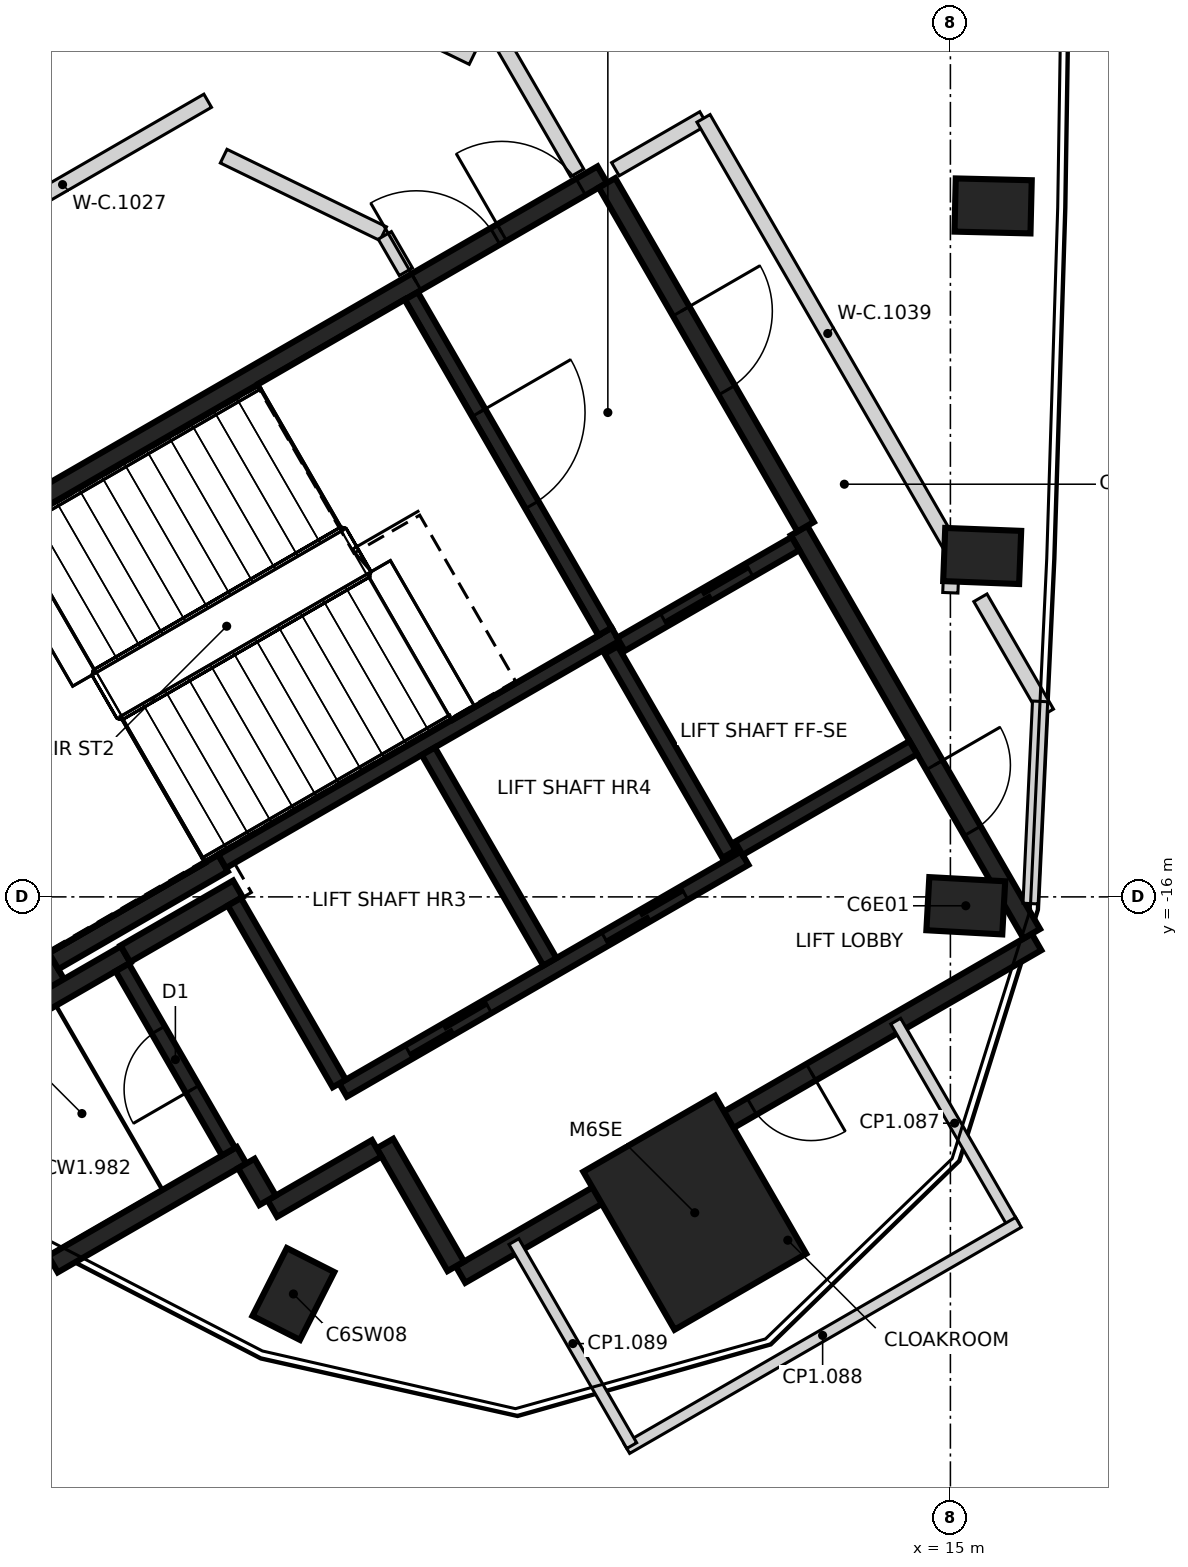
"""IFC4 building model, lengths in metres.
Left out: names, types, materials, properties, quantities, classifications, styles, units other than length and angle.
Written with IfcOpenShell. Run it as: python <this file> out.ifc"""

import sys

from ifc_helpers import new_model, si_unit, direction, frame, frame_2d, origin, origin_2d, place, context, subcontext, project, spatial, rectangle, extrude, element, fill, save


model = new_model("IFC4")
c1 = context("Model", 3, precision=1e-05, world=origin(), true_north=direction((0.0, 1.0)))
c2 = subcontext(c1, "Body", "Model", "MODEL_VIEW")
j1 = project(units=[si_unit("LENGTHUNIT", "METRE"), si_unit("PLANEANGLEUNIT", "RADIAN")], contexts=[c1])
p1 = place(None, origin())
s1 = spatial("IfcSite", under=j1, at=p1, CompositionType="ELEMENT")
p2 = place(p1, origin())
s2 = spatial("IfcBuilding", under=s1, at=p2, CompositionType="ELEMENT")
p3 = place(p2, frame((0.0, 0.0, 283.8)))
s3 = spatial("IfcBuildingStorey", under=s2, at=p3, CompositionType="ELEMENT", Elevation=283.8)
for number, where, z_axis, x_axis in (
    (1, (15.202, -16.117, -0.35), (0.0, 0.0, 1.0), (-0.998, 0.055, 0.0)),
    (2, (15.418, -11.515, -0.35), (0.0, 0.0, 1.0), (-0.999, 0.039, 0.0)),
    (3, (15.562, -6.91, -0.35), (0.0, 0.0, 1.0), (-1.0, 0.024, 0.0)),
    (4, (6.356, -21.224, -0.35), (0.0, 0.0, 1.0), (0.452, 0.892, 0.0)),
):
    element("IfcColumn", number, at=place(p3, frame(where, z_axis=z_axis, x_axis=x_axis)), inside=s3, PredefinedType="COLUMN", context=c2, shape_type="SweptSolid", body=[
        extrude(rectangle(XDim=1.0, YDim=0.7, at=origin_2d()), origin(), (0.0, 0.0, 1.0), 7.2),
    ])
p4 = place(p3, frame((11.637, -20.155, -0.35), z_axis=(0.0, 0.0, 1.0), x_axis=(-0.5, 0.866025403784, 0.0)))
e5 = element("IfcColumn", 5, at=p4, inside=s3, PredefinedType="COLUMN", context=c2, shape_type="SweptSolid", body=[
    extrude(rectangle(XDim=2.4, YDim=2.0, at=origin_2d()), origin(), (0.0, 0.0, 1.0), 7.2),
])
p5 = place(p3, frame((0.417, -12.273, 0.0), z_axis=(0.0, 0.0, 1.0), x_axis=(0.866021906294, 0.500006057782, 0.0)))
e6 = element("IfcWall", 6, at=p5, inside=s3, PredefinedType="SHEAR", context=c2, shape_type="SweptSolid", body=[
    extrude(rectangle(XDim=11.55, YDim=0.25, at=frame_2d((5.775, 0.0))), origin(), (0.0, 0.0, 1.0), 6.85),
])
p6 = place(p5, frame((10.025, 0.0, 0.0)))
e7 = element("IfcOpeningElement", 7, at=p6, cuts=e6, PredefinedType="OPENING", context=c2, shape_type="SweptSolid", body=[
    extrude(rectangle(XDim=1.2, YDim=2.1, at=frame_2d((0.6, 1.05))), frame((0.0, 0.135, 0.0), z_axis=(0.0, -1.0, 0.0), x_axis=(1.0, 0.0, 0.0)), (0.0, 0.0, 1.0), 0.27),
])
p7 = place(p5, frame((8.725, 0.0, 0.0)))
e8 = element("IfcOpeningElement", 8, at=p7, cuts=e6, PredefinedType="OPENING", context=c2, shape_type="SweptSolid", body=[
    extrude(rectangle(XDim=1.2, YDim=2.1, at=frame_2d((0.6, 1.05))), frame((0.0, 0.135, 0.0), z_axis=(0.0, -1.0, 0.0), x_axis=(1.0, 0.0, 0.0)), (0.0, 0.0, 1.0), 0.27),
])
p8 = place(p3, frame((16.133, -16.594, 0.0), z_axis=(0.0, 0.0, 1.0), x_axis=(-0.866022959057, -0.500004234368, 0.0)))
e9 = element("IfcWall", 9, at=p8, inside=s3, PredefinedType="SHEAR", context=c2, shape_type="SweptSolid", body=[
    extrude(rectangle(XDim=8.75, YDim=0.25, at=frame_2d((4.375, 0.0))), origin(), (0.0, 0.0, 1.0), 6.85),
])
p9 = place(p8, frame((3.425, 0.0, 0.0)))
e10 = element("IfcOpeningElement", 10, at=p9, cuts=e9, PredefinedType="OPENING", context=c2, shape_type="SweptSolid", body=[
    extrude(rectangle(XDim=0.9, YDim=2.1, at=frame_2d((0.45, 1.05))), frame((0.0, 0.135, 0.0), z_axis=(0.0, -1.0, 0.0), x_axis=(1.0, 0.0, 0.0)), (0.0, 0.0, 1.0), 0.27),
])
p10 = place(p3, frame((13.008, -11.181, 0.0), z_axis=(0.0, 0.0, 1.0), x_axis=(0.500001955336, -0.866024274868, 0.0)))
e11 = element("IfcWall", 11, at=p10, inside=s3, PredefinedType="SHEAR", context=c2, shape_type="SweptSolid", body=[
    extrude(rectangle(XDim=6.125, YDim=0.25, at=frame_2d((3.062, 0.0))), origin(), (0.0, 0.0, 1.0), 6.85),
])
p11 = place(p10, frame((3.563, 0.0, 0.0)))
e12 = element("IfcOpeningElement", 12, at=p11, cuts=e11, PredefinedType="OPENING", context=c2, shape_type="SweptSolid", body=[
    extrude(rectangle(XDim=1.0, YDim=2.1, at=frame_2d((0.5, 1.05))), frame((0.0, 0.135, 0.0), z_axis=(0.0, -1.0, 0.0), x_axis=(1.0, 0.0, 0.0)), (0.0, 0.0, 1.0), 0.27),
])
p12 = place(p3, frame((3.235, -17.153, 0.0), z_axis=(0.0, 0.0, 1.0), x_axis=(-0.500008851346, 0.866020293397, 0.0)))
e13 = element("IfcWall", 13, at=p12, inside=s3, PredefinedType="SHEAR", context=c2, shape_type="SweptSolid", body=[
    extrude(rectangle(XDim=5.51, YDim=0.25, at=frame_2d((2.755, 0.0))), origin(), (0.0, 0.0, 1.0), 6.85),
])
p13 = place(p3, frame((10.483, -6.606, 0.0), z_axis=(0.0, 0.0, 1.0), x_axis=(0.49999885962, -0.866026062182, 0.0)))
e14 = element("IfcWall", 14, at=p13, inside=s3, PredefinedType="SHEAR", context=c2, shape_type="SweptSolid", body=[
    extrude(rectangle(XDim=5.225, YDim=0.25, at=frame_2d((2.612, 0.0))), origin(), (0.0, 0.0, 1.0), 6.85),
])
p14 = place(p13, frame((1.95, 0.0, 0.0)))
e15 = element("IfcOpeningElement", 15, at=p14, cuts=e14, PredefinedType="OPENING", context=c2, shape_type="SweptSolid", body=[
    extrude(rectangle(XDim=1.2, YDim=2.1, at=frame_2d((0.6, 1.05))), frame((0.0, 0.135, 0.0), z_axis=(0.0, -1.0, 0.0), x_axis=(1.0, 0.0, 0.0)), (0.0, 0.0, 1.0), 0.27),
])
p15 = place(p3, frame((3.085, -20.894, 0.0), z_axis=(0.0, 0.0, 1.0), x_axis=(-0.499978833458, 0.866037623948, 0.0)))
e16 = element("IfcWall", 16, at=p15, inside=s3, PredefinedType="SHEAR", context=c2, shape_type="SweptSolid", body=[
    extrude(rectangle(XDim=3.05, YDim=0.25, at=frame_2d((1.525, 0.0))), origin(), (0.0, 0.0, 1.0), 6.85),
])
p16 = place(p3, frame((1.669, -18.19, 0.0), z_axis=(0.0, 0.0, 1.0), x_axis=(0.866042235819, 0.499970844928, 0.0)))
e17 = element("IfcWall", 17, at=p16, inside=s3, PredefinedType="SHEAR", context=c2, shape_type="SweptSolid", body=[
    extrude(rectangle(XDim=2.865, YDim=0.25, at=frame_2d((1.432, 0.0))), origin(), (0.0, 0.0, 1.0), 6.85),
])
p17 = place(p3, frame((5.675, -19.399, 0.0), z_axis=(0.0, 0.0, 1.0), x_axis=(-0.866026637627, -0.499997862916, 0.0)))
e18 = element("IfcWall", 18, at=p17, inside=s3, PredefinedType="SHEAR", context=c2, shape_type="SweptSolid", body=[
    extrude(rectangle(XDim=2.865, YDim=0.25, at=frame_2d((1.432, 0.0))), origin(), (0.0, 0.0, 1.0), 6.85),
])
p18 = place(p3, frame((5.431, -15.556, 0.0), z_axis=(0.0, 0.0, 1.0), x_axis=(-0.866022940537, -0.500004266446, 0.0)))
e19 = element("IfcWall", 19, at=p18, inside=s3, PredefinedType="SHEAR", context=c2, shape_type="SweptSolid", body=[
    extrude(rectangle(XDim=2.575, YDim=0.25, at=frame_2d((1.287, 0.0))), origin(), (0.0, 0.0, 1.0), 6.85),
])
p19 = place(p3, frame((8.493, -20.86, 0.0), z_axis=(0.0, 0.0, 1.0), x_axis=(-0.500039802285, 0.866002422705, 0.0)))
e20 = element("IfcWall", 20, at=p19, inside=s3, PredefinedType="SHEAR", context=c2, shape_type="SweptSolid", body=[
    extrude(rectangle(XDim=1.865, YDim=0.25, at=frame_2d((0.932, 0.0))), origin(), (0.0, 0.0, 1.0), 6.85),
])
p20 = place(p3, frame((4.145, -16.749, 0.0), z_axis=(0.0, 0.0, 1.0), x_axis=(0.866038183914, 0.499977863513, 0.0)))
e21 = element("IfcWall", 21, at=p20, inside=s3, PredefinedType="SHEAR", context=c2, shape_type="SweptSolid", body=[
    extrude(rectangle(XDim=1.71, YDim=0.25, at=frame_2d((0.855, 0.0))), origin(), (0.0, 0.0, 1.0), 6.85),
])
p21 = place(p3, frame((7.452, -19.308, 0.0), z_axis=(0.0, 0.0, 1.0), x_axis=(-0.866044474677, -0.49996696679, 0.0)))
e22 = element("IfcWall", 22, at=p21, inside=s3, PredefinedType="SHEAR", context=c2, shape_type="SweptSolid", body=[
    extrude(rectangle(XDim=1.584, YDim=0.25, at=frame_2d((0.792, 0.0))), origin(), (0.0, 0.0, 1.0), 6.85),
])
p22 = place(p3, frame((6.017, -19.992, 0.0), z_axis=(0.0, 0.0, 1.0), x_axis=(-0.500364886717, 0.865814633822, 0.0)))
e23 = element("IfcWall", 23, at=p22, inside=s3, PredefinedType="SHEAR", context=c2, shape_type="SweptSolid", body=[
    extrude(rectangle(XDim=0.559, YDim=0.25, at=frame_2d((0.28, 0.0))), origin(), (0.0, 0.0, 1.0), 6.85),
])
p23 = place(p3, frame((5.419, -15.534, 0.0), z_axis=(0.0, 0.0, 1.0), x_axis=(0.866029065029, 0.499993658486, 0.0)))
e24 = element("IfcWall", 24, at=p23, inside=s3, PredefinedType="SHEAR", context=c2, shape_type="SweptSolid", body=[
    extrude(rectangle(XDim=5.974, YDim=0.2, at=frame_2d((2.987, 0.0))), origin(), (0.0, 0.0, 1.0), 6.85),
])
p24 = place(p3, frame((7.01, -18.542, 0.0), z_axis=(0.0, 0.0, 1.0), x_axis=(0.866030299012, 0.499991521122, 0.0)))
e25 = element("IfcWall", 25, at=p24, inside=s3, PredefinedType="SHEAR", context=c2, shape_type="SweptSolid", body=[
    extrude(rectangle(XDim=6.1, YDim=0.2, at=frame_2d((3.05, 0.0))), origin(), (0.0, 0.0, 1.0), 6.85),
])
p25 = place(p24, frame((1.0, 0.0, 0.0)))
e26 = element("IfcOpeningElement", 26, at=p25, cuts=e25, PredefinedType="OPENING", context=c2, shape_type="SweptSolid", body=[
    extrude(rectangle(XDim=1.2, YDim=2.1, at=frame_2d((0.6, 1.05))), frame((0.0, 0.11, 0.0), z_axis=(0.0, -1.0, 0.0), x_axis=(1.0, 0.0, 0.0)), (0.0, 0.0, 1.0), 0.22),
])
p26 = place(p24, frame((3.982, 0.0, 0.0)))
e27 = element("IfcOpeningElement", 27, at=p26, cuts=e25, PredefinedType="OPENING", context=c2, shape_type="SweptSolid", body=[
    extrude(rectangle(XDim=1.2, YDim=2.1, at=frame_2d((0.6, 1.05))), frame((0.0, 0.11, 0.0), z_axis=(0.0, -1.0, 0.0), x_axis=(1.0, 0.0, 0.0)), (0.0, 0.0, 1.0), 0.22),
])
p27 = place(p3, frame((7.906, -8.094, 0.0), z_axis=(0.0, 0.0, 1.0), x_axis=(0.500027839223, -0.866009330205, 0.0)))
e28 = element("IfcWall", 28, at=p27, inside=s3, PredefinedType="SHEAR", context=c2, shape_type="SweptSolid", body=[
    extrude(rectangle(XDim=5.098, YDim=0.2, at=frame_2d((2.549, 0.0))), origin(), (0.0, 0.0, 1.0), 6.85),
])
p28 = place(p27, frame((1.774, 0.0, 0.0)))
e29 = element("IfcOpeningElement", 29, at=p28, cuts=e28, PredefinedType="OPENING", context=c2, shape_type="SweptSolid", body=[
    extrude(rectangle(XDim=1.4, YDim=2.1, at=frame_2d((0.7, 1.05))), frame((0.0, 0.11, 0.0), z_axis=(0.0, -1.0, 0.0), x_axis=(1.0, 0.0, 0.0)), (0.0, 0.0, 1.0), 0.22),
])
p29 = place(p3, frame((8.132, -14.084, 0.0), z_axis=(0.0, 0.0, 1.0), x_axis=(0.499997778408, -0.866026686418, 0.0)))
e30 = element("IfcWall", 30, at=p29, inside=s3, PredefinedType="SHEAR", context=c2, shape_type="SweptSolid", body=[
    extrude(rectangle(XDim=3.198, YDim=0.2, at=frame_2d((1.599, 0.0))), origin(), (0.0, 0.0, 1.0), 6.85),
])
p30 = place(p3, frame((5.503, -19.352, 0.0), z_axis=(0.0, 0.0, 1.0), x_axis=(-0.499986818241, 0.866033014143, 0.0)))
e31 = element("IfcWall", 31, at=p30, inside=s3, PredefinedType="SHEAR", context=c2, shape_type="SweptSolid", body=[
    extrude(rectangle(XDim=2.798, YDim=0.2, at=frame_2d((1.399, 0.0))), origin(), (0.0, 0.0, 1.0), 6.85),
])
p31 = place(p30, frame((0.949, 0.0, 0.0)))
e32 = element("IfcOpeningElement", 32, at=p31, cuts=e31, PredefinedType="OPENING", context=c2, shape_type="SweptSolid", body=[
    extrude(rectangle(XDim=0.9, YDim=2.1, at=frame_2d((0.45, 1.05))), frame((0.0, 0.11, 0.0), z_axis=(0.0, -1.0, 0.0), x_axis=(1.0, 0.0, 0.0)), (0.0, 0.0, 1.0), 0.22),
])
p32 = place(p3, frame((6.96, -18.455, 0.0), z_axis=(0.0, 0.0, 1.0), x_axis=(-0.499926705758, 0.866067716099, 0.0)))
e33 = element("IfcWall", 33, at=p32, inside=s3, PredefinedType="SHEAR", context=c2, shape_type="SweptSolid", body=[
    extrude(rectangle(XDim=2.759, YDim=0.2, at=frame_2d((1.38, 0.0))), origin(), (0.0, 0.0, 1.0), 6.85),
])
p33 = place(p3, frame((12.088, -15.437, 0.0), z_axis=(0.0, 0.0, 1.0), x_axis=(-0.500026960575, 0.86600983753, 0.0)))
e34 = element("IfcWall", 34, at=p33, inside=s3, PredefinedType="SHEAR", context=c2, shape_type="SweptSolid", body=[
    extrude(rectangle(XDim=3.1, YDim=0.2, at=frame_2d((1.55, 0.0))), origin(), (0.0, 0.0, 1.0), 6.85),
])
p34 = place(p3, frame((10.666, -12.678, 0.0), z_axis=(0.0, 0.0, 1.0), x_axis=(0.866018407898, 0.500012117035, 0.0)))
e35 = element("IfcWall", 35, at=p34, inside=s3, PredefinedType="SHEAR", context=c2, shape_type="SweptSolid", body=[
    extrude(rectangle(XDim=2.651, YDim=0.2, at=frame_2d((1.325, 0.0))), origin(), (0.0, 0.0, 1.0), 6.85),
])
p35 = place(p34, frame((0.652, 0.0, 0.0)))
e36 = element("IfcOpeningElement", 36, at=p35, cuts=e35, PredefinedType="OPENING", context=c2, shape_type="SweptSolid", body=[
    extrude(rectangle(XDim=1.3, YDim=2.1, at=frame_2d((0.65, 1.05))), frame((0.0, 0.11, 0.0), z_axis=(0.0, -1.0, 0.0), x_axis=(1.0, 0.0, 0.0)), (0.0, 0.0, 1.0), 0.22),
])
p36 = place(p3, frame((14.512, -14.037, 0.0), z_axis=(0.0, 0.0, 1.0), x_axis=(-0.866018407898, -0.500012117035, 0.0)))
e37 = element("IfcWall", 37, at=p36, inside=s3, PredefinedType="SHEAR", context=c2, shape_type="SweptSolid", body=[
    extrude(rectangle(XDim=2.651, YDim=0.2, at=frame_2d((1.325, 0.0))), origin(), (0.0, 0.0, 1.0), 6.85),
])
p37 = place(p3, frame((14.281, -17.635, 0.0), z_axis=(0.0, 0.0, 1.0), x_axis=(0.49999285859, -0.86602952684, 0.0)))
e38 = element("IfcWall", 38, at=p37, inside=s3, PredefinedType="PARTITIONING", context=c2, shape_type="SweptSolid", body=[
    extrude(rectangle(XDim=3.1, YDim=0.15, at=frame_2d((1.55, 0.0))), origin(), (0.0, 0.0, 1.0), 6.85),
])
p38 = place(p3, frame((15.896, -20.282, 0.0), z_axis=(0.0, 0.0, 1.0), x_axis=(-0.866017493347, -0.500013701029, 0.0)))
e39 = element("IfcWall", 39, at=p38, inside=s3, PredefinedType="PARTITIONING", context=c2, shape_type="SweptSolid", body=[
    extrude(rectangle(XDim=5.95, YDim=0.15, at=frame_2d((2.975, 0.0))), origin(), (0.0, 0.0, 1.0), 6.85),
])
p39 = place(p3, frame((10.808, -23.219, 0.0), z_axis=(0.0, 0.0, 1.0), x_axis=(-0.500026960575, 0.86600983753, 0.0)))
e40 = element("IfcWall", 40, at=p39, inside=s3, PredefinedType="PARTITIONING", context=c2, shape_type="SweptSolid", body=[
    extrude(rectangle(XDim=3.1, YDim=0.15, at=frame_2d((1.55, 0.0))), origin(), (0.0, 0.0, 1.0), 6.85),
])
p40 = place(p3, frame((1.41, -7.733, 0.0), z_axis=(0.0, 0.0, 1.0), x_axis=(0.865821381066, 0.50035321133, 0.0)))
e41 = element("IfcWall", 41, at=p40, inside=s3, PredefinedType="PARTITIONING", context=c2, shape_type="SweptSolid", body=[
    extrude(rectangle(XDim=4.411, YDim=0.2, at=frame_2d((2.206, 0.0))), origin(), (0.0, 0.0, 1.0), 6.85),
])
p41 = place(p3, frame((5.439, -6.255, 0.0), z_axis=(0.0, 0.0, 1.0), x_axis=(0.899432970097, -0.437058728665, 0.0)))
e42 = element("IfcWall", 42, at=p41, inside=s3, PredefinedType="PARTITIONING", context=c2, shape_type="SweptSolid", body=[
    extrude(rectangle(XDim=2.334, YDim=0.2, at=frame_2d((1.167, 0.0))), origin(), (0.0, 0.0, 1.0), 6.85),
])
p42 = place(p3, frame((6.587, -3.922, 0.0), z_axis=(0.0, 0.0, 1.0), x_axis=(0.899126380137, -0.437689104892, 0.0)))
e43 = element("IfcWall", 43, at=p42, inside=s3, PredefinedType="PARTITIONING", context=c2, shape_type="SweptSolid", body=[
    extrude(rectangle(XDim=2.365, YDim=0.2, at=frame_2d((1.182, 0.0))), origin(), (0.0, 0.0, 1.0), 6.85),
])
p43 = place(p3, frame((7.559, -7.297, 0.0), z_axis=(0.0, 0.0, 1.0), x_axis=(0.500740595022, -0.86559739862, 0.0)))
e44 = element("IfcWall", 44, at=p43, inside=s3, PredefinedType="PARTITIONING", context=c2, shape_type="SweptSolid", body=[
    extrude(rectangle(XDim=0.553, YDim=0.2, at=frame_2d((0.277, 0.0))), origin(), (0.0, 0.0, 1.0), 6.85),
])
p44 = place(p3, frame((9.1, -4.765, 0.0), z_axis=(0.0, 0.0, 1.0), x_axis=(0.500948590405, -0.865477041736, 0.0)))
e45 = element("IfcWall", 45, at=p44, inside=s3, PredefinedType="PARTITIONING", context=c2, shape_type="SweptSolid", body=[
    extrude(rectangle(XDim=1.976, YDim=0.2, at=frame_2d((0.988, 0.0))), origin(), (0.0, 0.0, 1.0), 6.85),
])
p45 = place(p3, frame((10.593, -6.427, 0.0), z_axis=(0.0, 0.0, 1.0), x_axis=(0.866115802186, 0.499843392678, 0.0)))
e46 = element("IfcWall", 46, at=p45, inside=s3, PredefinedType="PARTITIONING", context=c2, shape_type="SweptSolid", body=[
    extrude(rectangle(XDim=1.34, YDim=0.2, at=frame_2d((0.67, 0.0))), origin(), (0.0, 0.0, 1.0), 6.85),
])
p46 = place(p3, frame((11.752, -5.758, 0.0), z_axis=(0.0, 0.0, 1.0), x_axis=(0.500199816633, -0.865910008858, 0.0)))
e47 = element("IfcWall", 47, at=p46, inside=s3, PredefinedType="PARTITIONING", context=c2, shape_type="SweptSolid", body=[
    extrude(rectangle(XDim=6.537, YDim=0.2, at=frame_2d((3.269, 0.0))), origin(), (0.0, 0.0, 1.0), 6.85),
])
p47 = place(p3, frame((14.999, -11.999, 0.0), z_axis=(0.0, 0.0, 1.0), x_axis=(0.039465029208, 0.999220952277, 0.0)))
e48 = element("IfcWall", 48, at=p47, inside=s3, PredefinedType="PARTITIONING", context=c2, shape_type="SweptSolid", body=[
    extrude(rectangle(XDim=0.582, YDim=0.2, at=frame_2d((0.291, 0.0))), origin(), (0.0, 0.0, 1.0), 6.85),
])
p48 = place(p3, frame((15.395, -12.065, 0.0), z_axis=(0.0, 0.0, 1.0), x_axis=(0.500177586754, -0.865922849744, 0.0)))
e49 = element("IfcWall", 49, at=p48, inside=s3, PredefinedType="PARTITIONING", context=c2, shape_type="SweptSolid", body=[
    extrude(rectangle(XDim=1.749, YDim=0.2, at=frame_2d((0.875, 0.0))), origin(), (0.0, 0.0, 1.0), 5.95),
])
p49 = place(p3, frame((16.055, -16.088, 0.0), z_axis=(0.0, 0.0, 1.0), x_axis=(0.046937929303, 0.998897807983, 0.0)))
e50 = element("IfcWall", 50, at=p49, inside=s3, PredefinedType="PARTITIONING", context=c2, shape_type="SweptSolid", body=[
    extrude(rectangle(XDim=2.663, YDim=0.2, at=frame_2d((1.332, 0.0))), origin(), (0.0, 0.0, 1.0), 6.85),
])
p50 = place(p35, origin())
e51 = element("IfcDoor", 51, at=p50, inside=s3, OperationType="SLIDING_TO_LEFT", PredefinedType="DOOR", context=c2, shape_type="SweptSolid", body=[
    extrude(rectangle(XDim=1.3, YDim=2.1, at=frame_2d((0.65, 1.05))), frame((0.0, 0.025, 0.0), z_axis=(0.0, -1.0, 0.0), x_axis=(1.0, 0.0, 0.0)), (0.0, 0.0, 1.0), 0.05),
])
fill(e36, e51)
p51 = place(p25, origin())
e52 = element("IfcDoor", 52, at=p51, inside=s3, OperationType="DOUBLE_DOOR_SLIDING", PredefinedType="DOOR", context=c2, shape_type="SweptSolid", body=[
    extrude(rectangle(XDim=1.2, YDim=2.1, at=frame_2d((0.6, 1.05))), frame((0.0, 0.025, 0.0), z_axis=(0.0, -1.0, 0.0), x_axis=(1.0, 0.0, 0.0)), (0.0, 0.0, 1.0), 0.05),
])
fill(e26, e52)
p52 = place(p26, origin())
e53 = element("IfcDoor", 53, at=p52, inside=s3, OperationType="DOUBLE_DOOR_SLIDING", PredefinedType="DOOR", context=c2, shape_type="SweptSolid", body=[
    extrude(rectangle(XDim=1.2, YDim=2.1, at=frame_2d((0.6, 1.05))), frame((0.0, 0.025, 0.0), z_axis=(0.0, -1.0, 0.0), x_axis=(1.0, 0.0, 0.0)), (0.0, 0.0, 1.0), 0.05),
])
fill(e27, e53)
p53 = place(p11, origin())
e54 = element("IfcDoor", 54, at=p53, inside=s3, OperationType="SINGLE_SWING_LEFT", PredefinedType="DOOR", context=c2, shape_type="SweptSolid", body=[
    extrude(rectangle(XDim=1.0, YDim=2.1, at=frame_2d((0.5, 1.05))), frame((0.0, 0.025, 0.0), z_axis=(0.0, -1.0, 0.0), x_axis=(1.0, 0.0, 0.0)), (0.0, 0.0, 1.0), 0.05),
])
fill(e12, e54)
p54 = place(p6, origin())
e55 = element("IfcDoor", 55, at=p54, inside=s3, OperationType="SINGLE_SWING_LEFT", PredefinedType="DOOR", context=c2, shape_type="SweptSolid", body=[
    extrude(rectangle(XDim=1.2, YDim=2.1, at=frame_2d((0.6, 1.05))), frame((0.0, 0.025, 0.0), z_axis=(0.0, -1.0, 0.0), x_axis=(1.0, 0.0, 0.0)), (0.0, 0.0, 1.0), 0.05),
])
fill(e7, e55)
p55 = place(p7, origin())
e56 = element("IfcDoor", 56, at=p55, inside=s3, OperationType="SINGLE_SWING_RIGHT", PredefinedType="DOOR", context=c2, shape_type="SweptSolid", body=[
    extrude(rectangle(XDim=1.2, YDim=2.1, at=frame_2d((0.6, 1.05))), frame((0.0, 0.025, 0.0), z_axis=(0.0, -1.0, 0.0), x_axis=(1.0, 0.0, 0.0)), (0.0, 0.0, 1.0), 0.05),
])
fill(e8, e56)
p56 = place(p14, origin())
e57 = element("IfcDoor", 57, at=p56, inside=s3, OperationType="SINGLE_SWING_LEFT", PredefinedType="DOOR", context=c2, shape_type="SweptSolid", body=[
    extrude(rectangle(XDim=1.2, YDim=2.1, at=frame_2d((0.6, 1.05))), frame((0.0, 0.025, 0.0), z_axis=(0.0, -1.0, 0.0), x_axis=(1.0, 0.0, 0.0)), (0.0, 0.0, 1.0), 0.05),
])
fill(e15, e57)
p57 = place(p28, origin())
e58 = element("IfcDoor", 58, at=p57, inside=s3, OperationType="SINGLE_SWING_RIGHT", PredefinedType="DOOR", context=c2, shape_type="SweptSolid", body=[
    extrude(rectangle(XDim=1.4, YDim=2.1, at=frame_2d((0.7, 1.05))), frame((0.0, 0.025, 0.0), z_axis=(0.0, -1.0, 0.0), x_axis=(1.0, 0.0, 0.0)), (0.0, 0.0, 1.0), 0.05),
])
fill(e29, e58)
p58 = place(p31, origin())
e59 = element("IfcDoor", 59, at=p58, inside=s3, OperationType="SINGLE_SWING_LEFT", PredefinedType="DOOR", context=c2, shape_type="SweptSolid", body=[
    extrude(rectangle(XDim=0.9, YDim=2.1, at=frame_2d((0.45, 1.05))), frame((0.0, 0.025, 0.0), z_axis=(0.0, -1.0, 0.0), x_axis=(1.0, 0.0, 0.0)), (0.0, 0.0, 1.0), 0.05),
])
fill(e32, e59)
p59 = place(p9, origin())
e60 = element("IfcDoor", 60, at=p59, inside=s3, OperationType="SINGLE_SWING_LEFT", PredefinedType="DOOR", context=c2, shape_type="SweptSolid", body=[
    extrude(rectangle(XDim=0.9, YDim=2.1, at=frame_2d((0.45, 1.05))), frame((0.0, 0.025, 0.0), z_axis=(0.0, -1.0, 0.0), x_axis=(1.0, 0.0, 0.0)), (0.0, 0.0, 1.0), 0.05),
])
fill(e10, e60)
save(model, sys.argv[1])
